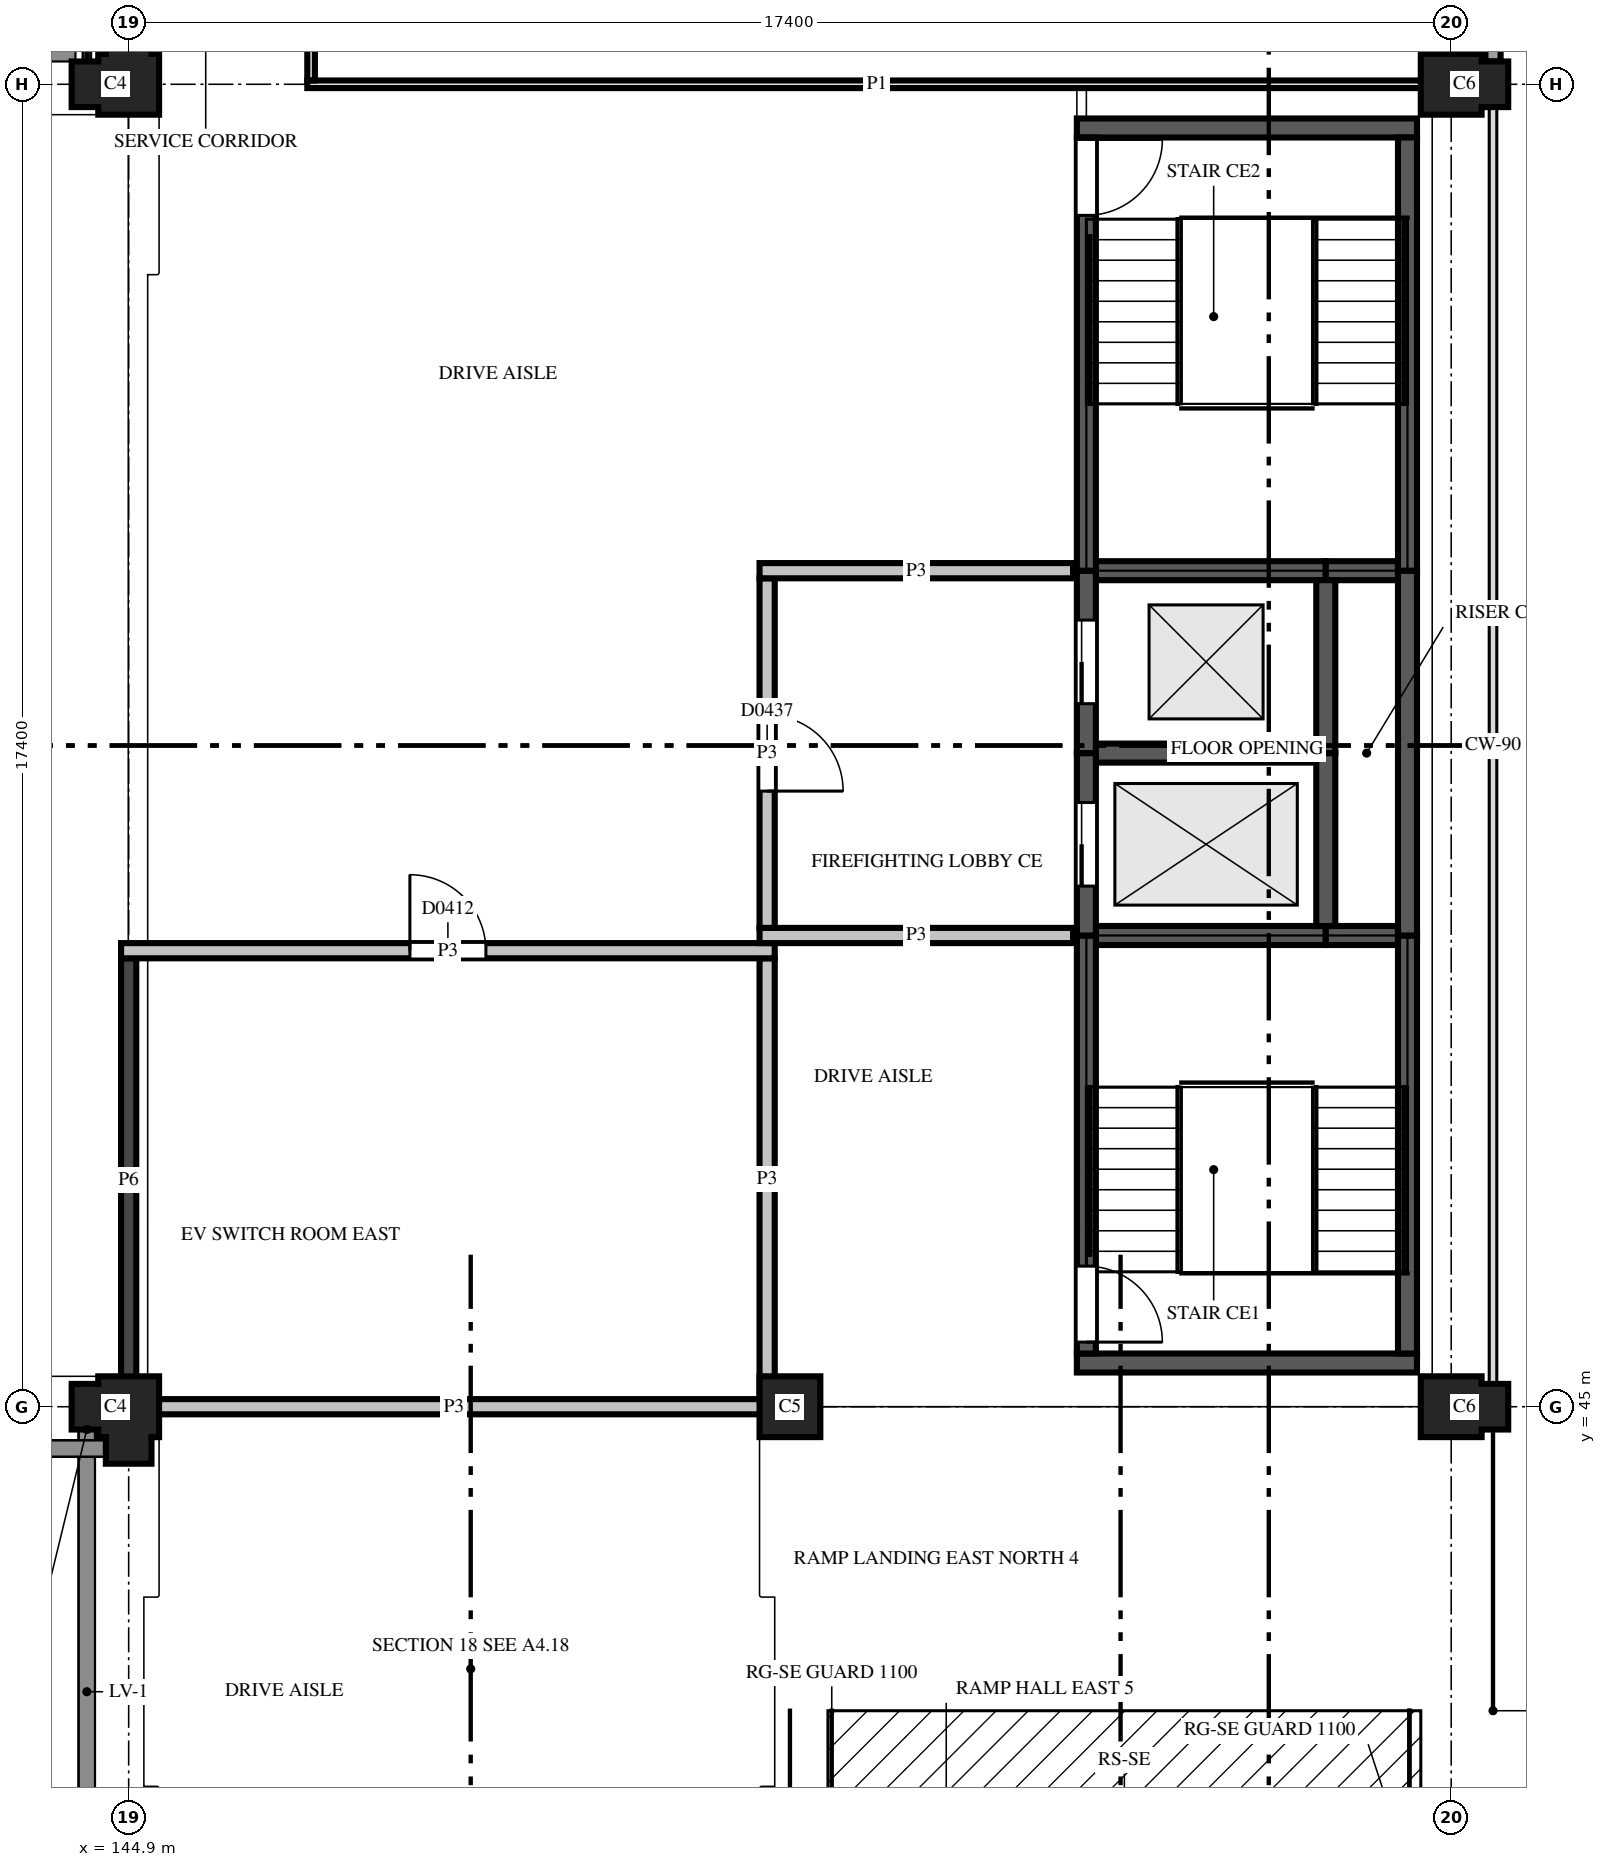
"""IFC4 building model, lengths in metres.
Left out: names, types, materials, properties, quantities, classifications, styles, units other than length and angle.
Written with IfcOpenShell. Run it as: python <this file> out.ifc"""

import sys

from ifc_helpers import new_model, si_unit, direction, frame, frame_2d, origin, place, context, subcontext, project, spatial, polyline, rectangle, outline, extrude, element, fill, save


model = new_model("IFC4")
c1 = context("Model", 3, precision=1e-05, world=origin(), true_north=direction((0.0, 1.0)))
c2 = subcontext(c1, "Body", "Model", "MODEL_VIEW")
j1 = project(units=[si_unit("LENGTHUNIT", "METRE"), si_unit("PLANEANGLEUNIT", "RADIAN")], contexts=[c1])
p1 = place(None, origin())
s1 = spatial("IfcSite", under=j1, at=p1, CompositionType="ELEMENT")
p2 = place(p1, origin())
s2 = spatial("IfcBuilding", under=s1, at=p2, CompositionType="ELEMENT")
p3 = place(p2, frame((0.0, 0.0, 15.6)))
s3 = spatial("IfcBuildingStorey", under=s2, at=p3, CompositionType="ELEMENT", Elevation=15.6)
p4 = place(p3, frame((144.9, 45.0, 0.0), z_axis=(0.0, 0.0, 1.0), x_axis=(-1.0, 0.0, 0.0)))
e1 = element("IfcColumn", 1, at=p4, inside=s3, PredefinedType="COLUMN", context=c2, shape_type="SweptSolid", body=[
    extrude(outline(polyline([(-0.4, -0.4), (0.4, -0.4), (0.4, -0.3), (0.75, -0.3), (0.75, 0.3), (0.4, 0.3), (0.4, 0.4), (0.3, 0.4), (0.3, 0.75), (-0.3, 0.75), (-0.3, 0.4), (-0.4, 0.4), (-0.4, -0.4)])), origin(), (0.0, 0.0, 1.0), 3.7),
])
p5 = place(p3, frame((153.6, 45.0, 0.0), z_axis=(0.0, 0.0, 1.0), x_axis=(1.0, 0.0, 0.0)))
e2 = element("IfcColumn", 2, at=p5, inside=s3, PredefinedType="COLUMN", context=c2, shape_type="SweptSolid", body=[
    extrude(outline(polyline([(-0.4, -0.4), (0.4, -0.4), (0.4, 0.4), (-0.4, 0.4), (-0.4, -0.4)])), origin(), (0.0, 0.0, 1.0), 3.7),
])
p6 = place(p3, frame((162.3, 45.0, 0.0), z_axis=(0.0, 0.0, 1.0), x_axis=(1.0, 0.0, 0.0)))
e3 = element("IfcColumn", 3, at=p6, inside=s3, PredefinedType="COLUMN", context=c2, shape_type="SweptSolid", body=[
    extrude(outline(polyline([(-0.4, -0.4), (0.4, -0.4), (0.4, -0.3), (0.75, -0.3), (0.75, 0.3), (0.4, 0.3), (0.4, 0.4), (-0.4, 0.4), (-0.4, -0.4)])), origin(), (0.0, 0.0, 1.0), 3.7),
])
p7 = place(p3, frame((144.9, 62.4, 0.0), z_axis=(0.0, 0.0, 1.0), x_axis=(0.0, 1.0, 0.0)))
e4 = element("IfcColumn", 4, at=p7, inside=s3, PredefinedType="COLUMN", context=c2, shape_type="SweptSolid", body=[
    extrude(outline(polyline([(-0.4, -0.4), (0.4, -0.4), (0.4, -0.3), (0.75, -0.3), (0.75, 0.3), (0.4, 0.3), (0.4, 0.4), (0.3, 0.4), (0.3, 0.75), (-0.3, 0.75), (-0.3, 0.4), (-0.4, 0.4), (-0.4, -0.4)])), origin(), (0.0, 0.0, 1.0), 3.7),
])
p8 = place(p3, frame((162.3, 62.4, 0.0), z_axis=(0.0, 0.0, 1.0), x_axis=(1.0, 0.0, 0.0)))
e5 = element("IfcColumn", 5, at=p8, inside=s3, PredefinedType="COLUMN", context=c2, shape_type="SweptSolid", body=[
    extrude(outline(polyline([(-0.4, -0.4), (0.4, -0.4), (0.4, -0.3), (0.75, -0.3), (0.75, 0.3), (0.4, 0.3), (0.4, 0.4), (-0.4, 0.4), (-0.4, -0.4)])), origin(), (0.0, 0.0, 1.0), 3.7),
])
p9 = place(p3, frame((157.375, 45.575, 0.0), z_axis=(0.0, 0.0, 1.0), x_axis=(1.0, 0.0, 0.0)))
e6 = element("IfcWall", 6, at=p9, inside=s3, PredefinedType="SHEAR", context=c2, shape_type="SweptSolid", body=[
    extrude(rectangle(XDim=4.475, YDim=0.25, at=frame_2d((2.238, 0.0))), origin(), (0.0, 0.0, 1.0), 3.7),
])
p10 = place(p3, frame((157.625, 51.2, 0.0), z_axis=(0.0, 0.0, 1.0), x_axis=(1.0, 0.0, 0.0)))
e7 = element("IfcWall", 7, at=p10, inside=s3, PredefinedType="SHEAR", context=c2, shape_type="SweptSolid", body=[
    extrude(rectangle(XDim=3.025, YDim=0.25, at=frame_2d((1.512, 0.0))), origin(), (0.0, 0.0, 1.0), 3.7),
])
p11 = place(p3, frame((160.65, 51.2, 0.0), z_axis=(0.0, 0.0, 1.0), x_axis=(1.0, 0.0, 0.0)))
e8 = element("IfcWall", 8, at=p11, inside=s3, PredefinedType="SHEAR", context=c2, shape_type="SweptSolid", body=[
    extrude(rectangle(XDim=0.95, YDim=0.25, at=frame_2d((0.475, 0.0))), origin(), (0.0, 0.0, 1.0), 3.7),
])
p12 = place(p3, frame((157.625, 53.6, 0.0), z_axis=(0.0, 0.0, 1.0), x_axis=(1.0, 0.0, 0.0)))
e9 = element("IfcWall", 9, at=p12, inside=s3, PredefinedType="SHEAR", context=c2, shape_type="SweptSolid", body=[
    extrude(rectangle(XDim=2.9, YDim=0.25, at=frame_2d((1.45, 0.0))), origin(), (0.0, 0.0, 1.0), 3.7),
])
p13 = place(p3, frame((157.625, 56.0, 0.0), z_axis=(0.0, 0.0, 1.0), x_axis=(1.0, 0.0, 0.0)))
e10 = element("IfcWall", 10, at=p13, inside=s3, PredefinedType="SHEAR", context=c2, shape_type="SweptSolid", body=[
    extrude(rectangle(XDim=3.025, YDim=0.25, at=frame_2d((1.512, 0.0))), origin(), (0.0, 0.0, 1.0), 3.7),
])
p14 = place(p3, frame((160.65, 56.0, 0.0), z_axis=(0.0, 0.0, 1.0), x_axis=(1.0, 0.0, 0.0)))
e11 = element("IfcWall", 11, at=p14, inside=s3, PredefinedType="SHEAR", context=c2, shape_type="SweptSolid", body=[
    extrude(rectangle(XDim=0.95, YDim=0.25, at=frame_2d((0.475, 0.0))), origin(), (0.0, 0.0, 1.0), 3.7),
])
p15 = place(p3, frame((157.375, 61.825, 0.0), z_axis=(0.0, 0.0, 1.0), x_axis=(1.0, 0.0, 0.0)))
e12 = element("IfcWall", 12, at=p15, inside=s3, PredefinedType="SHEAR", context=c2, shape_type="SweptSolid", body=[
    extrude(rectangle(XDim=4.475, YDim=0.25, at=frame_2d((2.238, 0.0))), origin(), (0.0, 0.0, 1.0), 3.7),
])
p16 = place(p3, frame((157.5, 45.7, 0.0), z_axis=(0.0, 0.0, 1.0), x_axis=(0.0, 1.0, 0.0)))
e13 = element("IfcWall", 13, at=p16, inside=s3, PredefinedType="SHEAR", context=c2, shape_type="SweptSolid", body=[
    extrude(rectangle(XDim=5.5, YDim=0.25, at=frame_2d((2.75, 0.0))), origin(), (0.0, 0.0, 1.0), 3.7),
])
p17 = place(p16, frame((0.15, 0.0, 0.0)))
e14 = element("IfcOpeningElement", 14, at=p17, cuts=e13, PredefinedType="OPENING", context=c2, shape_type="SweptSolid", body=[
    extrude(rectangle(XDim=1.0, YDim=2.1, at=frame_2d((0.5, 1.05))), frame((0.0, 0.135, 0.0), z_axis=(0.0, -1.0, 0.0), x_axis=(1.0, 0.0, 0.0)), (0.0, 0.0, 1.0), 0.27),
])
p18 = place(p3, frame((157.5, 51.2, 0.0), z_axis=(0.0, 0.0, 1.0), x_axis=(0.0, 1.0, 0.0)))
e15 = element("IfcWall", 15, at=p18, inside=s3, PredefinedType="SHEAR", context=c2, shape_type="SweptSolid", body=[
    extrude(rectangle(XDim=2.4, YDim=0.25, at=frame_2d((1.2, 0.0))), origin(), (0.0, 0.0, 1.0), 3.7),
])
p19 = place(p18, frame((0.65, 0.0, 0.0)))
e16 = element("IfcOpeningElement", 16, at=p19, cuts=e15, PredefinedType="OPENING", context=c2, shape_type="SweptSolid", body=[
    extrude(rectangle(XDim=1.1, YDim=2.1, at=frame_2d((0.55, 1.05))), frame((0.0, 0.135, 0.0), z_axis=(0.0, -1.0, 0.0), x_axis=(1.0, 0.0, 0.0)), (0.0, 0.0, 1.0), 0.27),
])
p20 = place(p3, frame((157.5, 53.6, 0.0), z_axis=(0.0, 0.0, 1.0), x_axis=(0.0, 1.0, 0.0)))
e17 = element("IfcWall", 17, at=p20, inside=s3, PredefinedType="SHEAR", context=c2, shape_type="SweptSolid", body=[
    extrude(rectangle(XDim=2.4, YDim=0.25, at=frame_2d((1.2, 0.0))), origin(), (0.0, 0.0, 1.0), 3.7),
])
p21 = place(p20, frame((0.65, 0.0, 0.0)))
e18 = element("IfcOpeningElement", 18, at=p21, cuts=e17, PredefinedType="OPENING", context=c2, shape_type="SweptSolid", body=[
    extrude(rectangle(XDim=1.1, YDim=2.1, at=frame_2d((0.55, 1.05))), frame((0.0, 0.135, 0.0), z_axis=(0.0, -1.0, 0.0), x_axis=(1.0, 0.0, 0.0)), (0.0, 0.0, 1.0), 0.27),
])
p22 = place(p3, frame((157.5, 56.0, 0.0), z_axis=(0.0, 0.0, 1.0), x_axis=(0.0, 1.0, 0.0)))
e19 = element("IfcWall", 19, at=p22, inside=s3, PredefinedType="SHEAR", context=c2, shape_type="SweptSolid", body=[
    extrude(rectangle(XDim=5.7, YDim=0.25, at=frame_2d((2.85, 0.0))), origin(), (0.0, 0.0, 1.0), 3.7),
])
p23 = place(p22, frame((4.675, 0.0, 0.0)))
e20 = element("IfcOpeningElement", 20, at=p23, cuts=e19, PredefinedType="OPENING", context=c2, shape_type="SweptSolid", body=[
    extrude(rectangle(XDim=1.0, YDim=2.1, at=frame_2d((0.5, 1.05))), frame((0.0, 0.135, 0.0), z_axis=(0.0, -1.0, 0.0), x_axis=(1.0, 0.0, 0.0)), (0.0, 0.0, 1.0), 0.27),
])
p24 = place(p3, frame((160.65, 51.325, 0.0), z_axis=(0.0, 0.0, 1.0), x_axis=(0.0, 1.0, 0.0)))
e21 = element("IfcWall", 21, at=p24, inside=s3, PredefinedType="SHEAR", context=c2, shape_type="SweptSolid", body=[
    extrude(rectangle(XDim=2.275, YDim=0.25, at=frame_2d((1.138, 0.0))), origin(), (0.0, 0.0, 1.0), 3.7),
])
p25 = place(p3, frame((160.65, 53.6, 0.0), z_axis=(0.0, 0.0, 1.0), x_axis=(0.0, 1.0, 0.0)))
e22 = element("IfcWall", 22, at=p25, inside=s3, PredefinedType="SHEAR", context=c2, shape_type="SweptSolid", body=[
    extrude(rectangle(XDim=2.275, YDim=0.25, at=frame_2d((1.137, 0.0))), origin(), (0.0, 0.0, 1.0), 3.7),
])
p26 = place(p3, frame((161.725, 45.7, 0.0), z_axis=(0.0, 0.0, 1.0), x_axis=(0.0, 1.0, 0.0)))
e23 = element("IfcWall", 23, at=p26, inside=s3, PredefinedType="SHEAR", context=c2, shape_type="SweptSolid", body=[
    extrude(rectangle(XDim=5.5, YDim=0.25, at=frame_2d((2.75, 0.0))), origin(), (0.0, 0.0, 1.0), 3.7),
])
p27 = place(p3, frame((161.725, 51.2, 0.0), z_axis=(0.0, 0.0, 1.0), x_axis=(0.0, 1.0, 0.0)))
e24 = element("IfcWall", 24, at=p27, inside=s3, PredefinedType="SHEAR", context=c2, shape_type="SweptSolid", body=[
    extrude(rectangle(XDim=4.8, YDim=0.25, at=frame_2d((2.4, 0.0))), origin(), (0.0, 0.0, 1.0), 3.7),
])
p28 = place(p3, frame((161.725, 56.0, 0.0), z_axis=(0.0, 0.0, 1.0), x_axis=(0.0, 1.0, 0.0)))
e25 = element("IfcWall", 25, at=p28, inside=s3, PredefinedType="SHEAR", context=c2, shape_type="SweptSolid", body=[
    extrude(rectangle(XDim=5.7, YDim=0.25, at=frame_2d((2.85, 0.0))), origin(), (0.0, 0.0, 1.0), 3.7),
])
p29 = place(p3, frame((162.85, 62.7, 0.0), z_axis=(0.0, 0.0, 1.0), x_axis=(0.0, 1.0, 0.0)))
e26 = element("IfcWall", 26, at=p29, inside=s3, PredefinedType="SOLIDWALL", context=c2, shape_type="SweptSolid", body=[
    extrude(rectangle(XDim=6.9, YDim=0.2, at=frame_2d((3.45, 0.0))), origin(), (0.0, 0.0, 1.0), 2.3),
])
p30 = place(p29, frame((2.25, 0.0, 0.55)))
e27 = element("IfcOpeningElement", 27, at=p30, cuts=e26, PredefinedType="OPENING", context=c2, shape_type="SweptSolid", body=[
    extrude(rectangle(XDim=2.4, YDim=1.0, at=frame_2d((1.2, 0.5))), frame((0.0, 0.11, 0.0), z_axis=(0.0, -1.0, 0.0), x_axis=(1.0, 0.0, 0.0)), (0.0, 0.0, 1.0), 0.22),
])
p31 = place(p3, frame((144.96, 45.0, 0.0), z_axis=(0.0, 0.0, 1.0), x_axis=(1.0, 0.0, 0.0)))
e28 = element("IfcWall", 28, at=p31, inside=s3, PredefinedType="PARTITIONING", context=c2, shape_type="SweptSolid", body=[
    extrude(rectangle(XDim=8.44, YDim=0.2, at=frame_2d((4.22, 0.0))), origin(), (0.0, 0.0, 1.0), 2.88),
])
p32 = place(p3, frame((153.3, 45.1, 0.0), z_axis=(0.0, 0.0, 1.0), x_axis=(0.0, 1.0, 0.0)))
e29 = element("IfcWall", 29, at=p32, inside=s3, PredefinedType="PARTITIONING", context=c2, shape_type="SweptSolid", body=[
    extrude(rectangle(XDim=5.8, YDim=0.2, at=frame_2d((2.9, 0.0))), origin(), (0.0, 0.0, 1.0), 2.88),
])
p33 = place(p3, frame((144.9, 50.9, 0.0), z_axis=(0.0, 0.0, 1.0), x_axis=(0.0, -1.0, 0.0)))
e30 = element("IfcWall", 30, at=p33, inside=s3, PredefinedType="PARTITIONING", context=c2, shape_type="SweptSolid", body=[
    extrude(rectangle(XDim=5.84, YDim=0.2, at=frame_2d((2.92, 0.0))), origin(), (0.0, 0.0, 1.0), 2.2),
])
p34 = place(p3, frame((153.4, 51.0, 0.0), z_axis=(0.0, 0.0, 1.0), x_axis=(-1.0, 0.0, 0.0)))
e31 = element("IfcWall", 31, at=p34, inside=s3, PredefinedType="PARTITIONING", context=c2, shape_type="SweptSolid", body=[
    extrude(rectangle(XDim=8.6, YDim=0.2, at=frame_2d((4.3, 0.0))), origin(), (0.0, 0.0, 1.0), 2.88),
])
p35 = place(p34, frame((3.8, 0.0, 0.0)))
e32 = element("IfcOpeningElement", 32, at=p35, cuts=e31, PredefinedType="OPENING", context=c2, shape_type="SweptSolid", body=[
    extrude(rectangle(XDim=1.0, YDim=2.1, at=frame_2d((0.5, 1.05))), frame((0.0, 0.11, 0.0), z_axis=(0.0, -1.0, 0.0), x_axis=(1.0, 0.0, 0.0)), (0.0, 0.0, 1.0), 0.22),
])
p36 = place(p3, frame((153.2, 51.2, 0.0), z_axis=(0.0, 0.0, 1.0), x_axis=(1.0, 0.0, 0.0)))
e33 = element("IfcWall", 33, at=p36, inside=s3, PredefinedType="PARTITIONING", context=c2, shape_type="SweptSolid", body=[
    extrude(rectangle(XDim=4.125, YDim=0.2, at=frame_2d((2.062, 0.0))), origin(), (0.0, 0.0, 1.0), 2.88),
])
p37 = place(p3, frame((153.3, 55.9, 0.0), z_axis=(0.0, 0.0, 1.0), x_axis=(0.0, -1.0, 0.0)))
e34 = element("IfcWall", 34, at=p37, inside=s3, PredefinedType="PARTITIONING", context=c2, shape_type="SweptSolid", body=[
    extrude(rectangle(XDim=4.6, YDim=0.2, at=frame_2d((2.3, 0.0))), origin(), (0.0, 0.0, 1.0), 2.88),
])
p38 = place(p37, frame((1.8, 0.0, 0.0)))
e35 = element("IfcOpeningElement", 35, at=p38, cuts=e34, PredefinedType="OPENING", context=c2, shape_type="SweptSolid", body=[
    extrude(rectangle(XDim=1.0, YDim=2.1, at=frame_2d((0.5, 1.05))), frame((0.0, 0.11, 0.0), z_axis=(0.0, -1.0, 0.0), x_axis=(1.0, 0.0, 0.0)), (0.0, 0.0, 1.0), 0.22),
])
p39 = place(p3, frame((157.325, 56.0, 0.0), z_axis=(0.0, 0.0, 1.0), x_axis=(-1.0, 0.0, 0.0)))
e36 = element("IfcWall", 36, at=p39, inside=s3, PredefinedType="PARTITIONING", context=c2, shape_type="SweptSolid", body=[
    extrude(rectangle(XDim=4.125, YDim=0.2, at=frame_2d((2.062, 0.0))), origin(), (0.0, 0.0, 1.0), 2.88),
])
p40 = place(p3, frame((147.25, 62.4, 0.0), z_axis=(0.0, 0.0, 1.0), x_axis=(1.0, 0.0, 0.0)))
e37 = element("IfcWall", 37, at=p40, inside=s3, PredefinedType="PARTITIONING", context=c2, shape_type="SweptSolid", body=[
    extrude(rectangle(XDim=14.99, YDim=0.1, at=frame_2d((7.495, 0.0))), origin(), (0.0, 0.0, 1.0), 2.88),
])
p41 = place(p3, frame((147.3, 77.35, 0.0), z_axis=(0.0, 0.0, 1.0), x_axis=(0.0, -1.0, 0.0)))
e38 = element("IfcWall", 38, at=p41, inside=s3, PredefinedType="PARTITIONING", context=c2, shape_type="SweptSolid", body=[
    extrude(rectangle(XDim=14.9, YDim=0.1, at=frame_2d((7.45, 0.0))), origin(), (0.0, 0.0, 1.0), 2.88),
])
p42 = place(p41, frame((7.0, 0.0, 0.0)))
e39 = element("IfcOpeningElement", 39, at=p42, cuts=e38, PredefinedType="OPENING", context=c2, shape_type="SweptSolid", body=[
    extrude(rectangle(XDim=0.9, YDim=2.1, at=frame_2d((0.45, 1.05))), frame((0.0, 0.06, 0.0), z_axis=(0.0, -1.0, 0.0), x_axis=(1.0, 0.0, 0.0)), (0.0, 0.0, 1.0), 0.12),
])
p43 = place(p35, origin())
e40 = element("IfcDoor", 40, at=p43, inside=s3, OperationType="SINGLE_SWING_RIGHT", PredefinedType="DOOR", context=c2, shape_type="SweptSolid", body=[
    extrude(rectangle(XDim=1.0, YDim=2.1, at=frame_2d((0.5, 1.05))), frame((0.0, 0.025, 0.0), z_axis=(0.0, -1.0, 0.0), x_axis=(1.0, 0.0, 0.0)), (0.0, 0.0, 1.0), 0.05),
])
fill(e32, e40)
p44 = place(p38, origin())
e41 = element("IfcDoor", 41, at=p44, inside=s3, OperationType="SINGLE_SWING_LEFT", PredefinedType="DOOR", context=c2, shape_type="SweptSolid", body=[
    extrude(rectangle(XDim=1.0, YDim=2.1, at=frame_2d((0.5, 1.05))), frame((0.0, 0.025, 0.0), z_axis=(0.0, -1.0, 0.0), x_axis=(1.0, 0.0, 0.0)), (0.0, 0.0, 1.0), 0.05),
])
fill(e35, e41)
p45 = place(p19, origin())
e42 = element("IfcDoor", 42, at=p45, inside=s3, OperationType="SLIDING_TO_LEFT", PredefinedType="DOOR", context=c2, shape_type="SweptSolid", body=[
    extrude(rectangle(XDim=1.1, YDim=2.1, at=frame_2d((0.55, 1.05))), frame((0.0, 0.025, 0.0), z_axis=(0.0, -1.0, 0.0), x_axis=(1.0, 0.0, 0.0)), (0.0, 0.0, 1.0), 0.05),
])
fill(e16, e42)
p46 = place(p21, origin())
e43 = element("IfcDoor", 43, at=p46, inside=s3, OperationType="SLIDING_TO_LEFT", PredefinedType="DOOR", context=c2, shape_type="SweptSolid", body=[
    extrude(rectangle(XDim=1.1, YDim=2.1, at=frame_2d((0.55, 1.05))), frame((0.0, 0.025, 0.0), z_axis=(0.0, -1.0, 0.0), x_axis=(1.0, 0.0, 0.0)), (0.0, 0.0, 1.0), 0.05),
])
fill(e18, e43)
p47 = place(p23, origin())
e44 = element("IfcDoor", 44, at=p47, inside=s3, OperationType="SINGLE_SWING_RIGHT", PredefinedType="DOOR", context=c2, shape_type="SweptSolid", body=[
    extrude(rectangle(XDim=1.0, YDim=2.1, at=frame_2d((0.5, 1.05))), frame((0.0, 0.025, 0.0), z_axis=(0.0, -1.0, 0.0), x_axis=(1.0, 0.0, 0.0)), (0.0, 0.0, 1.0), 0.05),
])
fill(e20, e44)
p48 = place(p17, origin())
e45 = element("IfcDoor", 45, at=p48, inside=s3, OperationType="SINGLE_SWING_LEFT", PredefinedType="DOOR", context=c2, shape_type="SweptSolid", body=[
    extrude(rectangle(XDim=1.0, YDim=2.1, at=frame_2d((0.5, 1.05))), frame((0.0, 0.025, 0.0), z_axis=(0.0, -1.0, 0.0), x_axis=(1.0, 0.0, 0.0)), (0.0, 0.0, 1.0), 0.05),
])
fill(e14, e45)
save(model, sys.argv[1])
